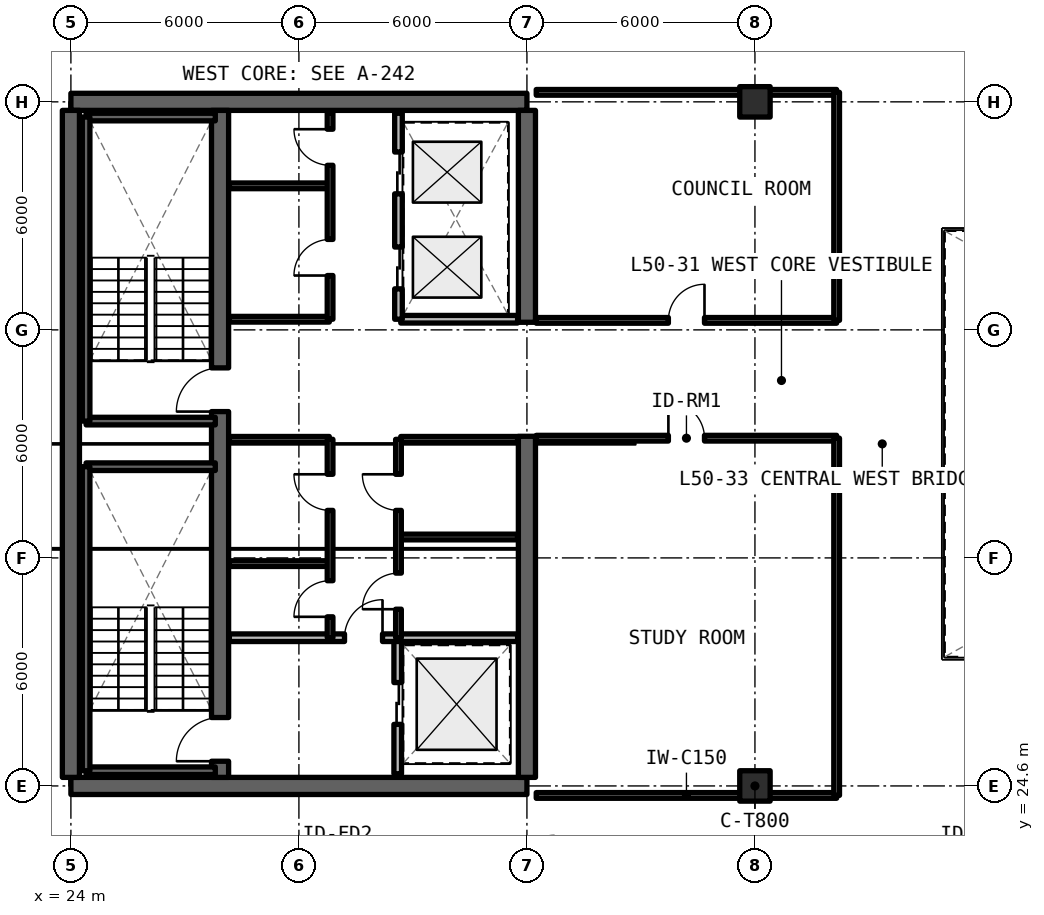
"""IFC4 building model, lengths in metres.
Left out: names, types, materials, properties, quantities, classifications, styles, units other than length and angle.
Written with IfcOpenShell. Run it as: python <this file> out.ifc"""

import sys

from ifc_helpers import new_model, si_unit, direction, frame, frame_2d, origin, origin_2d, place, context, subcontext, project, spatial, rectangle, extrude, element, fill, save


model = new_model("IFC4")
c1 = context("Model", 3, precision=1e-05, world=origin(), true_north=direction((0.0, 1.0)))
c2 = subcontext(c1, "Body", "Model", "MODEL_VIEW")
j1 = project(units=[si_unit("LENGTHUNIT", "METRE"), si_unit("PLANEANGLEUNIT", "RADIAN")], contexts=[c1])
p1 = place(None, origin())
s1 = spatial("IfcSite", under=j1, at=p1, CompositionType="ELEMENT")
p2 = place(p1, origin())
s2 = spatial("IfcBuilding", under=s1, at=p2, CompositionType="ELEMENT")
p3 = place(p2, frame((0.0, 0.0, 181.83)))
s3 = spatial("IfcBuildingStorey", under=s2, at=p3, CompositionType="ELEMENT", Elevation=181.83)
for number, where, z_axis, x_axis in (
    (1, (24.0, 24.6, 0.0), (0.0, 0.0, 1.0), (1.0, 0.0, 0.0)),
    (2, (36.0, 42.6, 0.0), (0.0, 0.0, 1.0), (-1.0, 0.0, 0.0)),
):
    element("IfcWall", number, at=place(p3, frame(where, z_axis=z_axis, x_axis=x_axis)), inside=s3, PredefinedType="SHEAR", context=c2, shape_type="SweptSolid", body=[
        extrude(rectangle(XDim=12.0, YDim=0.45, at=frame_2d((6.0, 0.0))), origin(), (0.0, 0.0, 1.0), 3.3),
    ])
p4 = place(p3, frame((24.0, 24.825, 0.0), z_axis=(0.0, 0.0, 1.0), x_axis=(0.0, 1.0, 0.0)))
e3 = element("IfcWall", 3, at=p4, inside=s3, PredefinedType="SHEAR", context=c2, shape_type="SweptSolid", body=[
    extrude(rectangle(XDim=17.55, YDim=0.45, at=frame_2d((8.775, 0.0))), origin(), (0.0, 0.0, 1.0), 3.3),
])
p5 = place(p3, frame((36.0, 24.825, 0.0), z_axis=(0.0, 0.0, 1.0), x_axis=(0.0, 1.0, 0.0)))
e4 = element("IfcWall", 4, at=p5, inside=s3, PredefinedType="SHEAR", context=c2, shape_type="SweptSolid", body=[
    extrude(rectangle(XDim=8.975, YDim=0.45, at=frame_2d((4.488, 0.0))), origin(), (0.0, 0.0, 1.0), 3.3),
])
p6 = place(p3, frame((36.0, 36.8, 0.0), z_axis=(0.0, 0.0, 1.0), x_axis=(0.0, 1.0, 0.0)))
e5 = element("IfcWall", 5, at=p6, inside=s3, PredefinedType="SHEAR", context=c2, shape_type="SweptSolid", body=[
    extrude(rectangle(XDim=5.575, YDim=0.45, at=frame_2d((2.788, 0.0))), origin(), (0.0, 0.0, 1.0), 3.3),
])
p7 = place(p3, frame((27.925, 24.825, 0.0), z_axis=(0.0, 0.0, 1.0), x_axis=(0.0, 1.0, 0.0)))
e6 = element("IfcWall", 6, at=p7, inside=s3, PredefinedType="SHEAR", context=c2, shape_type="SweptSolid", body=[
    extrude(rectangle(XDim=17.55, YDim=0.45, at=frame_2d((8.775, 0.0))), origin(), (0.0, 0.0, 1.0), 3.3),
])
p8 = place(p7, frame((0.425, 0.0, 0.0)))
e7 = element("IfcOpeningElement", 7, at=p8, cuts=e6, PredefinedType="OPENING", context=c2, shape_type="SweptSolid", body=[
    extrude(rectangle(XDim=1.15, YDim=2.15, at=frame_2d((0.575, 1.075))), frame((0.0, 0.235, 0.0), z_axis=(0.0, -1.0, 0.0), x_axis=(1.0, 0.0, 0.0)), (0.0, 0.0, 1.0), 0.47),
])
p9 = place(p7, frame((9.625, 0.0, 0.0)))
e8 = element("IfcOpeningElement", 8, at=p9, cuts=e6, PredefinedType="OPENING", context=c2, shape_type="SweptSolid", body=[
    extrude(rectangle(XDim=1.15, YDim=2.15, at=frame_2d((0.575, 1.075))), frame((0.0, 0.235, 0.0), z_axis=(0.0, -1.0, 0.0), x_axis=(1.0, 0.0, 0.0)), (0.0, 0.0, 1.0), 0.47),
])
for number, where, z_axis, x_axis in (
    (9, (42.0, 24.6, 0.0), (0.0, 0.0, 1.0), (1.0, 0.0, 0.0)),
    (10, (42.0, 42.6, 0.0), (0.0, 0.0, 1.0), (1.0, 0.0, 0.0)),
):
    element("IfcColumn", number, at=place(p3, frame(where, z_axis=z_axis, x_axis=x_axis)), inside=s3, PredefinedType="COLUMN", context=c2, shape_type="SweptSolid", body=[
        extrude(rectangle(XDim=0.8, YDim=0.8, at=origin_2d()), origin(), (0.0, 0.0, 1.0), 3.3),
    ])
p10 = place(p3, frame((32.6, 24.92, 0.0), z_axis=(0.0, 0.0, 1.0), x_axis=(0.0, 1.0, 0.0)))
e11 = element("IfcWall", 11, at=p10, inside=s3, PredefinedType="SOLIDWALL", context=c2, shape_type="SweptSolid", body=[
    extrude(rectangle(XDim=3.58, YDim=0.2, at=frame_2d((1.79, 0.0))), origin(), (0.0, 0.0, 1.0), 2.35),
])
p11 = place(p10, frame((1.3, 0.0, 0.0)))
e12 = element("IfcOpeningElement", 12, at=p11, cuts=e11, PredefinedType="OPENING", context=c2, shape_type="SweptSolid", body=[
    extrude(rectangle(XDim=1.1, YDim=2.2, at=frame_2d((0.55, 1.1))), frame((0.0, 0.11, 0.0), z_axis=(0.0, -1.0, 0.0), x_axis=(1.0, 0.0, 0.0)), (0.0, 0.0, 1.0), 0.22),
])
p12 = place(p3, frame((28.17, 28.5, 0.0), z_axis=(0.0, 0.0, 1.0), x_axis=(1.0, 0.0, 0.0)))
e13 = element("IfcWall", 13, at=p12, inside=s3, PredefinedType="SOLIDWALL", context=c2, shape_type="SweptSolid", body=[
    extrude(rectangle(XDim=7.585, YDim=0.2, at=frame_2d((3.792, 0.0))), origin(), (0.0, 0.0, 1.0), 2.35),
])
p13 = place(p12, frame((3.03, 0.0, 0.0)))
e14 = element("IfcOpeningElement", 14, at=p13, cuts=e13, PredefinedType="OPENING", context=c2, shape_type="SweptSolid", body=[
    extrude(rectangle(XDim=1.0, YDim=2.15, at=frame_2d((0.5, 1.075))), frame((0.0, 0.11, 0.0), z_axis=(0.0, -1.0, 0.0), x_axis=(1.0, 0.0, 0.0)), (0.0, 0.0, 1.0), 0.22),
])
for number, where, z_axis, x_axis in (
    (15, (28.17, 30.45, 0.0), (0.0, 0.0, 1.0), (1.0, 0.0, 0.0)),
    (16, (28.17, 33.72, 0.0), (0.0, 0.0, 1.0), (1.0, 0.0, 0.0)),
):
    element("IfcWall", number, at=place(p3, frame(where, z_axis=z_axis, x_axis=x_axis)), inside=s3, PredefinedType="SOLIDWALL", context=c2, shape_type="SweptSolid", body=[
        extrude(rectangle(XDim=2.63, YDim=0.15, at=frame_2d((1.315, 0.0))), origin(), (0.0, 0.0, 1.0), 2.35),
    ])
p14 = place(p3, frame((30.82, 28.5, 0.0), z_axis=(0.0, 0.0, 1.0), x_axis=(0.0, 1.0, 0.0)))
e17 = element("IfcWall", 17, at=p14, inside=s3, PredefinedType="SOLIDWALL", context=c2, shape_type="SweptSolid", body=[
    extrude(rectangle(XDim=5.22, YDim=0.15, at=frame_2d((2.61, 0.0))), origin(), (0.0, 0.0, 1.0), 2.35),
])
p15 = place(p14, frame((0.55, 0.0, 0.0)))
e18 = element("IfcOpeningElement", 18, at=p15, cuts=e17, PredefinedType="OPENING", context=c2, shape_type="SweptSolid", body=[
    extrude(rectangle(XDim=0.95, YDim=2.15, at=frame_2d((0.475, 1.075))), frame((0.0, 0.085, 0.0), z_axis=(0.0, -1.0, 0.0), x_axis=(1.0, 0.0, 0.0)), (0.0, 0.0, 1.0), 0.17),
])
p16 = place(p14, frame((3.35, 0.0, 0.0)))
e19 = element("IfcOpeningElement", 19, at=p16, cuts=e17, PredefinedType="OPENING", context=c2, shape_type="SweptSolid", body=[
    extrude(rectangle(XDim=0.95, YDim=2.15, at=frame_2d((0.475, 1.075))), frame((0.0, 0.085, 0.0), z_axis=(0.0, -1.0, 0.0), x_axis=(1.0, 0.0, 0.0)), (0.0, 0.0, 1.0), 0.17),
])
for number, where, z_axis, x_axis in (
    (20, (32.68, 31.15, 0.0), (0.0, 0.0, 1.0), (1.0, 0.0, 0.0)),
    (21, (32.68, 33.72, 0.0), (0.0, 0.0, 1.0), (1.0, 0.0, 0.0)),
):
    element("IfcWall", number, at=place(p3, frame(where, z_axis=z_axis, x_axis=x_axis)), inside=s3, PredefinedType="SOLIDWALL", context=c2, shape_type="SweptSolid", body=[
        extrude(rectangle(XDim=3.075, YDim=0.15, at=frame_2d((1.538, 0.0))), origin(), (0.0, 0.0, 1.0), 2.35),
    ])
p17 = place(p3, frame((32.62, 28.5, 0.0), z_axis=(0.0, 0.0, 1.0), x_axis=(0.0, 1.0, 0.0)))
e22 = element("IfcWall", 22, at=p17, inside=s3, PredefinedType="SOLIDWALL", context=c2, shape_type="SweptSolid", body=[
    extrude(rectangle(XDim=5.22, YDim=0.15, at=frame_2d((2.61, 0.0))), origin(), (0.0, 0.0, 1.0), 2.35),
])
p18 = place(p17, frame((0.75, 0.0, 0.0)))
e23 = element("IfcOpeningElement", 23, at=p18, cuts=e22, PredefinedType="OPENING", context=c2, shape_type="SweptSolid", body=[
    extrude(rectangle(XDim=0.95, YDim=2.15, at=frame_2d((0.475, 1.075))), frame((0.0, 0.085, 0.0), z_axis=(0.0, -1.0, 0.0), x_axis=(1.0, 0.0, 0.0)), (0.0, 0.0, 1.0), 0.17),
])
p19 = place(p17, frame((3.35, 0.0, 0.0)))
e24 = element("IfcOpeningElement", 24, at=p19, cuts=e22, PredefinedType="OPENING", context=c2, shape_type="SweptSolid", body=[
    extrude(rectangle(XDim=0.95, YDim=2.15, at=frame_2d((0.475, 1.075))), frame((0.0, 0.085, 0.0), z_axis=(0.0, -1.0, 0.0), x_axis=(1.0, 0.0, 0.0)), (0.0, 0.0, 1.0), 0.17),
])
for number, where, z_axis, x_axis in (
    (25, (28.17, 36.88, 0.0), (0.0, 0.0, 1.0), (1.0, 0.0, 0.0)),
    (26, (28.17, 40.39, 0.0), (0.0, 0.0, 1.0), (1.0, 0.0, 0.0)),
):
    element("IfcWall", number, at=place(p3, frame(where, z_axis=z_axis, x_axis=x_axis)), inside=s3, PredefinedType="SOLIDWALL", context=c2, shape_type="SweptSolid", body=[
        extrude(rectangle(XDim=2.63, YDim=0.15, at=frame_2d((1.315, 0.0))), origin(), (0.0, 0.0, 1.0), 2.35),
    ])
p20 = place(p3, frame((30.82, 36.88, 0.0), z_axis=(0.0, 0.0, 1.0), x_axis=(0.0, 1.0, 0.0)))
e27 = element("IfcWall", 27, at=p20, inside=s3, PredefinedType="SOLIDWALL", context=c2, shape_type="SweptSolid", body=[
    extrude(rectangle(XDim=5.42, YDim=0.15, at=frame_2d((2.71, 0.0))), origin(), (0.0, 0.0, 1.0), 2.35),
])
p21 = place(p20, frame((1.15, 0.0, 0.0)))
e28 = element("IfcOpeningElement", 28, at=p21, cuts=e27, PredefinedType="OPENING", context=c2, shape_type="SweptSolid", body=[
    extrude(rectangle(XDim=0.95, YDim=2.15, at=frame_2d((0.475, 1.075))), frame((0.0, 0.085, 0.0), z_axis=(0.0, -1.0, 0.0), x_axis=(1.0, 0.0, 0.0)), (0.0, 0.0, 1.0), 0.17),
])
p22 = place(p20, frame((4.05, 0.0, 0.0)))
e29 = element("IfcOpeningElement", 29, at=p22, cuts=e27, PredefinedType="OPENING", context=c2, shape_type="SweptSolid", body=[
    extrude(rectangle(XDim=0.95, YDim=2.15, at=frame_2d((0.475, 1.075))), frame((0.0, 0.085, 0.0), z_axis=(0.0, -1.0, 0.0), x_axis=(1.0, 0.0, 0.0)), (0.0, 0.0, 1.0), 0.17),
])
p23 = place(p3, frame((32.68, 36.88, 0.0), z_axis=(0.0, 0.0, 1.0), x_axis=(1.0, 0.0, 0.0)))
e30 = element("IfcWall", 30, at=p23, inside=s3, PredefinedType="SOLIDWALL", context=c2, shape_type="SweptSolid", body=[
    extrude(rectangle(XDim=3.075, YDim=0.2, at=frame_2d((1.538, 0.0))), origin(), (0.0, 0.0, 1.0), 2.35),
])
p24 = place(p3, frame((32.62, 36.88, 0.0), z_axis=(0.0, 0.0, 1.0), x_axis=(0.0, 1.0, 0.0)))
e31 = element("IfcWall", 31, at=p24, inside=s3, PredefinedType="SOLIDWALL", context=c2, shape_type="SweptSolid", body=[
    extrude(rectangle(XDim=5.42, YDim=0.2, at=frame_2d((2.71, 0.0))), origin(), (0.0, 0.0, 1.0), 2.35),
])
p25 = place(p24, frame((0.8, 0.0, 0.0)))
e32 = element("IfcOpeningElement", 32, at=p25, cuts=e31, PredefinedType="OPENING", context=c2, shape_type="SweptSolid", body=[
    extrude(rectangle(XDim=1.1, YDim=2.2, at=frame_2d((0.55, 1.1))), frame((0.0, 0.11, 0.0), z_axis=(0.0, -1.0, 0.0), x_axis=(1.0, 0.0, 0.0)), (0.0, 0.0, 1.0), 0.22),
])
p26 = place(p24, frame((3.3, 0.0, 0.0)))
e33 = element("IfcOpeningElement", 33, at=p26, cuts=e31, PredefinedType="OPENING", context=c2, shape_type="SweptSolid", body=[
    extrude(rectangle(XDim=1.1, YDim=2.2, at=frame_2d((0.55, 1.1))), frame((0.0, 0.11, 0.0), z_axis=(0.0, -1.0, 0.0), x_axis=(1.0, 0.0, 0.0)), (0.0, 0.0, 1.0), 0.22),
])
p27 = place(p3, frame((36.245, 24.35, 0.0), z_axis=(0.0, 0.0, 1.0), x_axis=(1.0, 0.0, 0.0)))
e34 = element("IfcWall", 34, at=p27, inside=s3, PredefinedType="SOLIDWALL", context=c2, shape_type="SweptSolid", body=[
    extrude(rectangle(XDim=7.905, YDim=0.15, at=frame_2d((3.952, 0.0))), origin(), (0.0, 0.0, 1.0), 2.35),
])
p28 = place(p3, frame((36.245, 33.75, 0.0), z_axis=(0.0, 0.0, 1.0), x_axis=(1.0, 0.0, 0.0)))
e35 = element("IfcWall", 35, at=p28, inside=s3, PredefinedType="SOLIDWALL", context=c2, shape_type="SweptSolid", body=[
    extrude(rectangle(XDim=7.905, YDim=0.15, at=frame_2d((3.952, 0.0))), origin(), (0.0, 0.0, 1.0), 2.35),
])
p29 = place(p28, frame((3.478, 0.0, 0.0)))
e36 = element("IfcOpeningElement", 36, at=p29, cuts=e35, PredefinedType="OPENING", context=c2, shape_type="SweptSolid", body=[
    extrude(rectangle(XDim=0.95, YDim=2.15, at=frame_2d((0.475, 1.075))), frame((0.0, 0.085, 0.0), z_axis=(0.0, -1.0, 0.0), x_axis=(1.0, 0.0, 0.0)), (0.0, 0.0, 1.0), 0.17),
])
p30 = place(p3, frame((44.15, 24.35, 0.0), z_axis=(0.0, 0.0, 1.0), x_axis=(0.0, 1.0, 0.0)))
e37 = element("IfcWall", 37, at=p30, inside=s3, PredefinedType="SOLIDWALL", context=c2, shape_type="SweptSolid", body=[
    extrude(rectangle(XDim=9.4, YDim=0.15, at=frame_2d((4.7, 0.0))), origin(), (0.0, 0.0, 1.0), 2.35),
])
p31 = place(p3, frame((36.245, 36.85, 0.0), z_axis=(0.0, 0.0, 1.0), x_axis=(1.0, 0.0, 0.0)))
e38 = element("IfcWall", 38, at=p31, inside=s3, PredefinedType="SOLIDWALL", context=c2, shape_type="SweptSolid", body=[
    extrude(rectangle(XDim=7.905, YDim=0.15, at=frame_2d((3.952, 0.0))), origin(), (0.0, 0.0, 1.0), 2.35),
])
p32 = place(p31, frame((3.478, 0.0, 0.0)))
e39 = element("IfcOpeningElement", 39, at=p32, cuts=e38, PredefinedType="OPENING", context=c2, shape_type="SweptSolid", body=[
    extrude(rectangle(XDim=0.95, YDim=2.15, at=frame_2d((0.475, 1.075))), frame((0.0, 0.085, 0.0), z_axis=(0.0, -1.0, 0.0), x_axis=(1.0, 0.0, 0.0)), (0.0, 0.0, 1.0), 0.17),
])
p33 = place(p3, frame((36.245, 42.85, 0.0), z_axis=(0.0, 0.0, 1.0), x_axis=(1.0, 0.0, 0.0)))
e40 = element("IfcWall", 40, at=p33, inside=s3, PredefinedType="SOLIDWALL", context=c2, shape_type="SweptSolid", body=[
    extrude(rectangle(XDim=7.905, YDim=0.15, at=frame_2d((3.952, 0.0))), origin(), (0.0, 0.0, 1.0), 2.35),
])
p34 = place(p3, frame((44.15, 36.85, 0.0), z_axis=(0.0, 0.0, 1.0), x_axis=(0.0, 1.0, 0.0)))
e41 = element("IfcWall", 41, at=p34, inside=s3, PredefinedType="SOLIDWALL", context=c2, shape_type="SweptSolid", body=[
    extrude(rectangle(XDim=6.0, YDim=0.15, at=frame_2d((3.0, 0.0))), origin(), (0.0, 0.0, 1.0), 2.35),
])
for number, where, z_axis, x_axis in (
    (42, (24.4, 25.0, 0.0), (0.0, 0.0, 1.0), (1.0, 0.0, 0.0)),
    (43, (27.8, 33.0, 0.0), (0.0, 0.0, 1.0), (-1.0, 0.0, 0.0)),
):
    element("IfcWall", number, at=place(p3, frame(where, z_axis=z_axis, x_axis=x_axis)), inside=s3, PredefinedType="SOLIDWALL", context=c2, shape_type="SweptSolid", body=[
        extrude(rectangle(XDim=3.4, YDim=0.2, at=frame_2d((1.7, 0.0))), origin(), (0.0, 0.0, 1.0), 3.3),
    ])
p35 = place(p3, frame((24.4, 33.0, 0.0), z_axis=(0.0, 0.0, 1.0), x_axis=(0.0, -1.0, 0.0)))
e44 = element("IfcWall", 44, at=p35, inside=s3, PredefinedType="SOLIDWALL", context=c2, shape_type="SweptSolid", body=[
    extrude(rectangle(XDim=8.0, YDim=0.2, at=frame_2d((4.0, 0.0))), origin(), (0.0, 0.0, 1.0), 3.3),
])
for number, where, z_axis, x_axis in (
    (45, (24.4, 34.2, 0.0), (0.0, 0.0, 1.0), (1.0, 0.0, 0.0)),
    (46, (27.8, 42.2, 0.0), (0.0, 0.0, 1.0), (-1.0, 0.0, 0.0)),
):
    element("IfcWall", number, at=place(p3, frame(where, z_axis=z_axis, x_axis=x_axis)), inside=s3, PredefinedType="SOLIDWALL", context=c2, shape_type="SweptSolid", body=[
        extrude(rectangle(XDim=3.4, YDim=0.2, at=frame_2d((1.7, 0.0))), origin(), (0.0, 0.0, 1.0), 3.3),
    ])
p36 = place(p3, frame((24.4, 42.2, 0.0), z_axis=(0.0, 0.0, 1.0), x_axis=(0.0, -1.0, 0.0)))
e47 = element("IfcWall", 47, at=p36, inside=s3, PredefinedType="SOLIDWALL", context=c2, shape_type="SweptSolid", body=[
    extrude(rectangle(XDim=8.0, YDim=0.2, at=frame_2d((4.0, 0.0))), origin(), (0.0, 0.0, 1.0), 3.3),
])
p37 = place(p11, origin())
e48 = element("IfcDoor", 48, at=p37, inside=s3, OperationType="SLIDING_TO_LEFT", PredefinedType="DOOR", context=c2, shape_type="SweptSolid", body=[
    extrude(rectangle(XDim=1.1, YDim=2.2, at=frame_2d((0.55, 1.1))), frame((0.0, 0.025, 0.0), z_axis=(0.0, -1.0, 0.0), x_axis=(1.0, 0.0, 0.0)), (0.0, 0.0, 1.0), 0.05),
])
fill(e12, e48)
p38 = place(p13, origin())
e49 = element("IfcDoor", 49, at=p38, inside=s3, OperationType="SINGLE_SWING_RIGHT", PredefinedType="DOOR", context=c2, shape_type="SweptSolid", body=[
    extrude(rectangle(XDim=1.0, YDim=2.15, at=frame_2d((0.5, 1.075))), frame((0.0, 0.025, 0.0), z_axis=(0.0, -1.0, 0.0), x_axis=(1.0, 0.0, 0.0)), (0.0, 0.0, 1.0), 0.05),
])
fill(e14, e49)
p39 = place(p15, origin())
e50 = element("IfcDoor", 50, at=p39, inside=s3, OperationType="SINGLE_SWING_LEFT", PredefinedType="DOOR", context=c2, shape_type="SweptSolid", body=[
    extrude(rectangle(XDim=0.95, YDim=2.15, at=frame_2d((0.475, 1.075))), frame((0.0, 0.025, 0.0), z_axis=(0.0, -1.0, 0.0), x_axis=(1.0, 0.0, 0.0)), (0.0, 0.0, 1.0), 0.05),
])
fill(e18, e50)
p40 = place(p16, origin())
e51 = element("IfcDoor", 51, at=p40, inside=s3, OperationType="SINGLE_SWING_RIGHT", PredefinedType="DOOR", context=c2, shape_type="SweptSolid", body=[
    extrude(rectangle(XDim=0.95, YDim=2.15, at=frame_2d((0.475, 1.075))), frame((0.0, 0.025, 0.0), z_axis=(0.0, -1.0, 0.0), x_axis=(1.0, 0.0, 0.0)), (0.0, 0.0, 1.0), 0.05),
])
fill(e19, e51)
p41 = place(p18, origin())
e52 = element("IfcDoor", 52, at=p41, inside=s3, OperationType="SINGLE_SWING_LEFT", PredefinedType="DOOR", context=c2, shape_type="SweptSolid", body=[
    extrude(rectangle(XDim=0.95, YDim=2.15, at=frame_2d((0.475, 1.075))), frame((0.0, 0.025, 0.0), z_axis=(0.0, -1.0, 0.0), x_axis=(1.0, 0.0, 0.0)), (0.0, 0.0, 1.0), 0.05),
])
fill(e23, e52)
p42 = place(p19, origin())
e53 = element("IfcDoor", 53, at=p42, inside=s3, OperationType="SINGLE_SWING_RIGHT", PredefinedType="DOOR", context=c2, shape_type="SweptSolid", body=[
    extrude(rectangle(XDim=0.95, YDim=2.15, at=frame_2d((0.475, 1.075))), frame((0.0, 0.025, 0.0), z_axis=(0.0, -1.0, 0.0), x_axis=(1.0, 0.0, 0.0)), (0.0, 0.0, 1.0), 0.05),
])
fill(e24, e53)
p43 = place(p21, origin())
e54 = element("IfcDoor", 54, at=p43, inside=s3, OperationType="SINGLE_SWING_LEFT", PredefinedType="DOOR", context=c2, shape_type="SweptSolid", body=[
    extrude(rectangle(XDim=0.95, YDim=2.15, at=frame_2d((0.475, 1.075))), frame((0.0, 0.025, 0.0), z_axis=(0.0, -1.0, 0.0), x_axis=(1.0, 0.0, 0.0)), (0.0, 0.0, 1.0), 0.05),
])
fill(e28, e54)
p44 = place(p22, origin())
e55 = element("IfcDoor", 55, at=p44, inside=s3, OperationType="SINGLE_SWING_RIGHT", PredefinedType="DOOR", context=c2, shape_type="SweptSolid", body=[
    extrude(rectangle(XDim=0.95, YDim=2.15, at=frame_2d((0.475, 1.075))), frame((0.0, 0.025, 0.0), z_axis=(0.0, -1.0, 0.0), x_axis=(1.0, 0.0, 0.0)), (0.0, 0.0, 1.0), 0.05),
])
fill(e29, e55)
p45 = place(p25, origin())
e56 = element("IfcDoor", 56, at=p45, inside=s3, OperationType="SLIDING_TO_LEFT", PredefinedType="DOOR", context=c2, shape_type="SweptSolid", body=[
    extrude(rectangle(XDim=1.1, YDim=2.2, at=frame_2d((0.55, 1.1))), frame((0.0, 0.025, 0.0), z_axis=(0.0, -1.0, 0.0), x_axis=(1.0, 0.0, 0.0)), (0.0, 0.0, 1.0), 0.05),
])
fill(e32, e56)
p46 = place(p26, origin())
e57 = element("IfcDoor", 57, at=p46, inside=s3, OperationType="SLIDING_TO_RIGHT", PredefinedType="DOOR", context=c2, shape_type="SweptSolid", body=[
    extrude(rectangle(XDim=1.1, YDim=2.2, at=frame_2d((0.55, 1.1))), frame((0.0, 0.025, 0.0), z_axis=(0.0, -1.0, 0.0), x_axis=(1.0, 0.0, 0.0)), (0.0, 0.0, 1.0), 0.05),
])
fill(e33, e57)
p47 = place(p29, origin())
e58 = element("IfcDoor", 58, at=p47, inside=s3, OperationType="SINGLE_SWING_LEFT", PredefinedType="DOOR", context=c2, shape_type="SweptSolid", body=[
    extrude(rectangle(XDim=0.95, YDim=2.15, at=frame_2d((0.475, 1.075))), frame((0.0, 0.025, 0.0), z_axis=(0.0, -1.0, 0.0), x_axis=(1.0, 0.0, 0.0)), (0.0, 0.0, 1.0), 0.05),
])
fill(e36, e58)
p48 = place(p32, origin())
e59 = element("IfcDoor", 59, at=p48, inside=s3, OperationType="SINGLE_SWING_RIGHT", PredefinedType="DOOR", context=c2, shape_type="SweptSolid", body=[
    extrude(rectangle(XDim=0.95, YDim=2.15, at=frame_2d((0.475, 1.075))), frame((0.0, 0.025, 0.0), z_axis=(0.0, -1.0, 0.0), x_axis=(1.0, 0.0, 0.0)), (0.0, 0.0, 1.0), 0.05),
])
fill(e39, e59)
p49 = place(p8, origin())
e60 = element("IfcDoor", 60, at=p49, inside=s3, OperationType="SINGLE_SWING_RIGHT", PredefinedType="DOOR", context=c2, shape_type="SweptSolid", body=[
    extrude(rectangle(XDim=1.15, YDim=2.15, at=frame_2d((0.575, 1.075))), frame((0.0, 0.025, 0.0), z_axis=(0.0, -1.0, 0.0), x_axis=(1.0, 0.0, 0.0)), (0.0, 0.0, 1.0), 0.05),
])
fill(e7, e60)
p50 = place(p9, origin())
e61 = element("IfcDoor", 61, at=p50, inside=s3, OperationType="SINGLE_SWING_LEFT", PredefinedType="DOOR", context=c2, shape_type="SweptSolid", body=[
    extrude(rectangle(XDim=1.15, YDim=2.15, at=frame_2d((0.575, 1.075))), frame((0.0, 0.025, 0.0), z_axis=(0.0, -1.0, 0.0), x_axis=(1.0, 0.0, 0.0)), (0.0, 0.0, 1.0), 0.05),
])
fill(e8, e61)
save(model, sys.argv[1])
